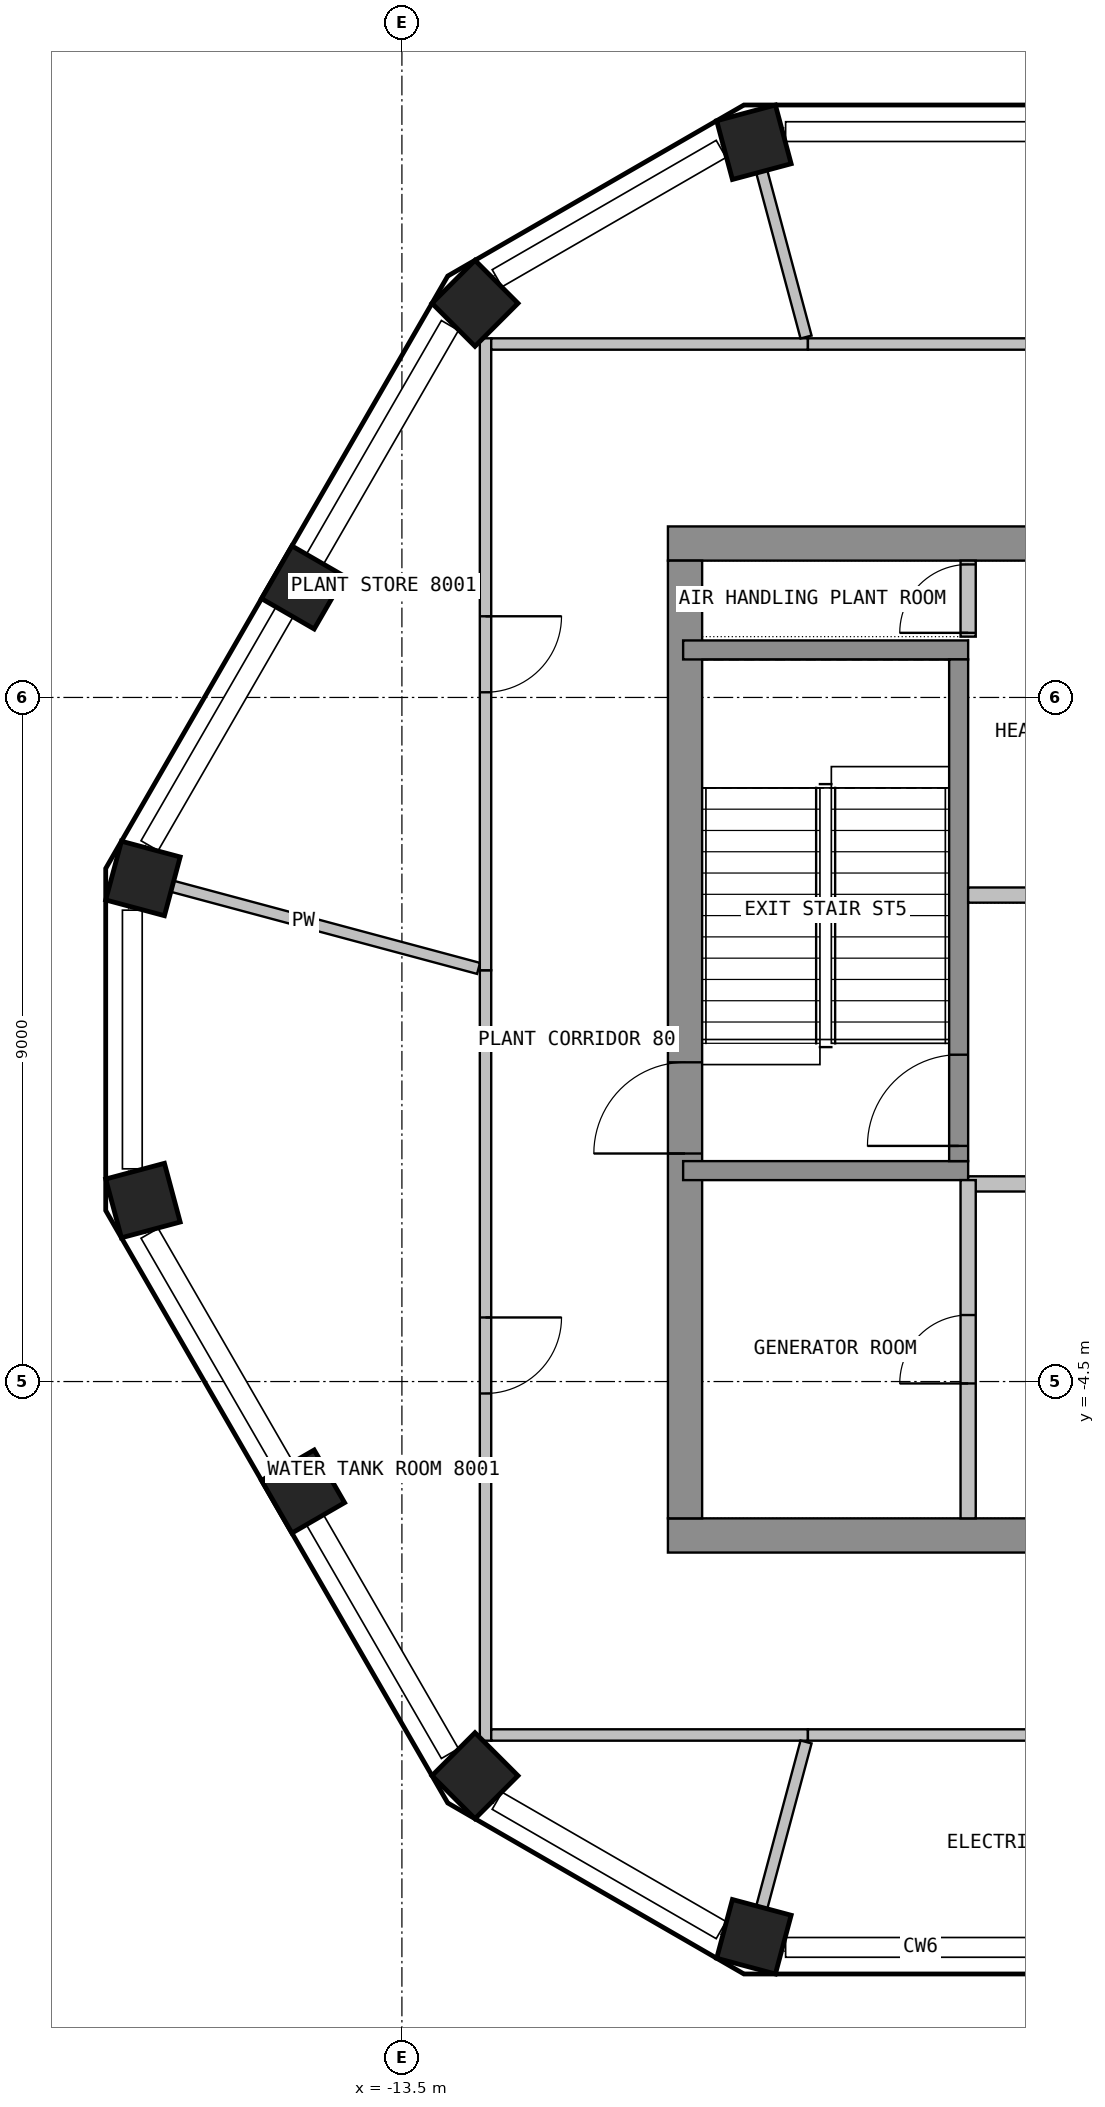
"""IFC4 building model, lengths in metres.
Left out: names, types, materials, properties, quantities, classifications, styles, units other than length and angle.
Written with IfcOpenShell. Run it as: python <this file> out.ifc"""

import sys

from ifc_helpers import new_model, si_unit, direction, frame, frame_2d, origin, origin_2d, place, context, subcontext, project, spatial, rectangle, extrude, element, fill, save


model = new_model("IFC4")
c1 = context("Model", 3, precision=1e-05, world=origin(), true_north=direction((0.0, 1.0)))
c2 = subcontext(c1, "Body", "Model", "MODEL_VIEW")
j1 = project(units=[si_unit("LENGTHUNIT", "METRE"), si_unit("PLANEANGLEUNIT", "RADIAN")], contexts=[c1])
p1 = place(None, origin())
s1 = spatial("IfcSite", under=j1, at=p1, CompositionType="ELEMENT")
p2 = place(p1, origin())
s2 = spatial("IfcBuilding", under=s1, at=p2, CompositionType="ELEMENT")
p3 = place(p2, frame((0.0, 0.0, 327.9)))
s3 = spatial("IfcBuildingStorey", under=s2, at=p3, CompositionType="ELEMENT", Elevation=327.9)
for number, where, z_axis, x_axis in (
    (1, (-8.869, -11.804, 0.0), (0.0, 0.0, 1.0), (0.966, -0.259, 0.0)),
    (2, (-8.869, 11.804, 0.0), (0.0, 0.0, 1.0), (-0.966, -0.259, 0.0)),
    (3, (-12.539, 9.686, 0.0), (0.0, 0.0, 1.0), (-0.707, -0.707, 0.0)),
    (4, (-14.801, 5.947, 0.0), (0.0, 0.0, 1.0), (-0.5, -0.866, 0.0)),
    (5, (-16.907, 2.119, 0.0), (0.0, 0.0, 1.0), (-0.259, -0.966, 0.0)),
    (6, (-16.907, -2.119, 0.0), (0.0, 0.0, 1.0), (0.259, -0.966, 0.0)),
    (7, (-14.801, -5.947, 0.0), (0.0, 0.0, 1.0), (0.5, -0.866, 0.0)),
    (8, (-12.539, -9.686, 0.0), (0.0, 0.0, 1.0), (0.707, -0.707, 0.0)),
):
    element("IfcColumn", number, at=place(p3, frame(where, z_axis=z_axis, x_axis=x_axis)), inside=s3, PredefinedType="COLUMN", context=c2, shape_type="SweptSolid", body=[
        extrude(rectangle(XDim=0.8, YDim=0.8, at=origin_2d()), origin(), (0.0, 0.0, 1.0), 3.6),
    ])
for number, where, z_axis, x_axis in (
    (9, (-10.0, 6.525, 0.0), (0.0, 0.0, 1.0), (1.0, 0.0, 0.0)),
    (10, (-10.0, -6.525, 0.0), (0.0, 0.0, 1.0), (1.0, 0.0, 0.0)),
):
    element("IfcWall", number, at=place(p3, frame(where, z_axis=z_axis, x_axis=x_axis)), inside=s3, PredefinedType="SHEAR", context=c2, shape_type="SweptSolid", body=[
        extrude(rectangle(XDim=20.0, YDim=0.45, at=frame_2d((10.0, 0.0))), origin(), (0.0, 0.0, 1.0), 3.6),
    ])
p4 = place(p3, frame((-9.775, -6.3, 0.0), z_axis=(0.0, 0.0, 1.0), x_axis=(0.0, 1.0, 0.0)))
e11 = element("IfcWall", 11, at=p4, inside=s3, PredefinedType="SHEAR", context=c2, shape_type="SweptSolid", body=[
    extrude(rectangle(XDim=12.6, YDim=0.45, at=frame_2d((6.3, 0.0))), origin(), (0.0, 0.0, 1.0), 3.6),
])
p5 = place(p4, frame((4.8, 0.0, 0.0)))
e12 = element("IfcOpeningElement", 12, at=p5, cuts=e11, PredefinedType="OPENING", context=c2, shape_type="SweptSolid", body=[
    extrude(rectangle(XDim=1.2, YDim=2.1, at=frame_2d((0.6, 1.05))), frame((0.0, 0.235, 0.0), z_axis=(0.0, -1.0, 0.0), x_axis=(1.0, 0.0, 0.0)), (0.0, 0.0, 1.0), 0.47),
])
for number, where, z_axis, x_axis in (
    (13, (-9.8, -1.725, 0.0), (0.0, 0.0, 1.0), (1.0, 0.0, 0.0)),
    (14, (-9.8, 5.125, 0.0), (0.0, 0.0, 1.0), (1.0, 0.0, 0.0)),
):
    element("IfcWall", number, at=place(p3, frame(where, z_axis=z_axis, x_axis=x_axis)), inside=s3, PredefinedType="SHEAR", context=c2, shape_type="SweptSolid", body=[
        extrude(rectangle(XDim=3.75, YDim=0.25, at=frame_2d((1.875, 0.0))), origin(), (0.0, 0.0, 1.0), 3.6),
    ])
p6 = place(p3, frame((-6.175, -1.6, 0.0), z_axis=(0.0, 0.0, 1.0), x_axis=(0.0, 1.0, 0.0)))
e15 = element("IfcWall", 15, at=p6, inside=s3, PredefinedType="SHEAR", context=c2, shape_type="SweptSolid", body=[
    extrude(rectangle(XDim=6.6, YDim=0.25, at=frame_2d((3.3, 0.0))), origin(), (0.0, 0.0, 1.0), 3.6),
])
p7 = place(p6, frame((0.2, 0.0, 0.0)))
e16 = element("IfcOpeningElement", 16, at=p7, cuts=e15, PredefinedType="OPENING", context=c2, shape_type="SweptSolid", body=[
    extrude(rectangle(XDim=1.2, YDim=2.1, at=frame_2d((0.6, 1.05))), frame((0.0, 0.135, 0.0), z_axis=(0.0, -1.0, 0.0), x_axis=(1.0, 0.0, 0.0)), (0.0, 0.0, 1.0), 0.27),
])
p8 = place(p3, frame((-6.05, 1.9, 0.0), z_axis=(0.0, 0.0, 1.0), x_axis=(1.0, 0.0, 0.0)))
e17 = element("IfcWall", 17, at=p8, inside=s3, PredefinedType="PARTITIONING", context=c2, shape_type="SweptSolid", body=[
    extrude(rectangle(XDim=4.525, YDim=0.2, at=frame_2d((2.263, 0.0))), origin(), (0.0, 0.0, 1.0), 3.6),
])
p9 = place(p8, frame((1.812, 0.0, 0.0)))
e18 = element("IfcOpeningElement", 18, at=p9, cuts=e17, PredefinedType="OPENING", context=c2, shape_type="SweptSolid", body=[
    extrude(rectangle(XDim=0.9, YDim=2.1, at=frame_2d((0.45, 1.05))), frame((0.0, 0.11, 0.0), z_axis=(0.0, -1.0, 0.0), x_axis=(1.0, 0.0, 0.0)), (0.0, 0.0, 1.0), 0.22),
])
p10 = place(p3, frame((-6.05, -1.9, 0.0), z_axis=(0.0, 0.0, 1.0), x_axis=(1.0, 0.0, 0.0)))
e19 = element("IfcWall", 19, at=p10, inside=s3, PredefinedType="PARTITIONING", context=c2, shape_type="SweptSolid", body=[
    extrude(rectangle(XDim=4.525, YDim=0.2, at=frame_2d((2.263, 0.0))), origin(), (0.0, 0.0, 1.0), 3.6),
])
p11 = place(p10, frame((1.812, 0.0, 0.0)))
e20 = element("IfcOpeningElement", 20, at=p11, cuts=e19, PredefinedType="OPENING", context=c2, shape_type="SweptSolid", body=[
    extrude(rectangle(XDim=0.9, YDim=2.1, at=frame_2d((0.45, 1.05))), frame((0.0, 0.11, 0.0), z_axis=(0.0, -1.0, 0.0), x_axis=(1.0, 0.0, 0.0)), (0.0, 0.0, 1.0), 0.22),
])
p12 = place(p3, frame((-6.05, 5.3, 0.0), z_axis=(0.0, 0.0, 1.0), x_axis=(0.0, 1.0, 0.0)))
e21 = element("IfcWall", 21, at=p12, inside=s3, PredefinedType="PARTITIONING", context=c2, shape_type="SweptSolid", body=[
    extrude(rectangle(XDim=1.0, YDim=0.2, at=frame_2d((0.5, 0.0))), origin(), (0.0, 0.0, 1.0), 3.6),
])
p13 = place(p12, frame((0.05, 0.0, 0.0)))
e22 = element("IfcOpeningElement", 22, at=p13, cuts=e21, PredefinedType="OPENING", context=c2, shape_type="SweptSolid", body=[
    extrude(rectangle(XDim=0.9, YDim=2.1, at=frame_2d((0.45, 1.05))), frame((0.0, 0.11, 0.0), z_axis=(0.0, -1.0, 0.0), x_axis=(1.0, 0.0, 0.0)), (0.0, 0.0, 1.0), 0.22),
])
p14 = place(p3, frame((-6.05, -6.3, 0.0), z_axis=(0.0, 0.0, 1.0), x_axis=(0.0, 1.0, 0.0)))
e23 = element("IfcWall", 23, at=p14, inside=s3, PredefinedType="PARTITIONING", context=c2, shape_type="SweptSolid", body=[
    extrude(rectangle(XDim=4.45, YDim=0.2, at=frame_2d((2.225, 0.0))), origin(), (0.0, 0.0, 1.0), 3.6),
])
p15 = place(p14, frame((1.775, 0.0, 0.0)))
e24 = element("IfcOpeningElement", 24, at=p15, cuts=e23, PredefinedType="OPENING", context=c2, shape_type="SweptSolid", body=[
    extrude(rectangle(XDim=0.9, YDim=2.1, at=frame_2d((0.45, 1.05))), frame((0.0, 0.11, 0.0), z_axis=(0.0, -1.0, 0.0), x_axis=(1.0, 0.0, 0.0)), (0.0, 0.0, 1.0), 0.22),
])
p16 = place(p3, frame((-17.097, 2.17, 0.0), z_axis=(0.0, 0.0, 1.0), x_axis=(0.965904388236, -0.258899039756, 0.0)))
e25 = element("IfcWall", 25, at=p16, inside=s3, PredefinedType="PARTITIONING", context=c2, shape_type="SweptSolid", body=[
    extrude(rectangle(XDim=4.768, YDim=0.15, at=frame_2d((2.384, 0.0))), origin(), (0.0, 0.0, 1.0), 3.6),
])
p17 = place(p3, frame((-12.4, 0.911, 0.0), z_axis=(0.0, 0.0, 1.0), x_axis=(0.0, -1.0, 0.0)))
e26 = element("IfcWall", 26, at=p17, inside=s3, PredefinedType="PARTITIONING", context=c2, shape_type="SweptSolid", body=[
    extrude(rectangle(XDim=10.136, YDim=0.15, at=frame_2d((5.068, 0.0))), origin(), (0.0, 0.0, 1.0), 3.6),
])
p18 = place(p17, frame((4.568, 0.0, 0.0)))
e27 = element("IfcOpeningElement", 27, at=p18, cuts=e26, PredefinedType="OPENING", context=c2, shape_type="SweptSolid", body=[
    extrude(rectangle(XDim=1.0, YDim=2.1, at=frame_2d((0.5, 1.05))), frame((0.0, 0.085, 0.0), z_axis=(0.0, -1.0, 0.0), x_axis=(1.0, 0.0, 0.0)), (0.0, 0.0, 1.0), 0.17),
])
p19 = place(p3, frame((-12.325, -9.15, 0.0), z_axis=(0.0, 0.0, 1.0), x_axis=(1.0, 0.0, 0.0)))
e28 = element("IfcWall", 28, at=p19, inside=s3, PredefinedType="PARTITIONING", context=c2, shape_type="SweptSolid", body=[
    extrude(rectangle(XDim=4.167, YDim=0.15, at=frame_2d((2.083, 0.0))), origin(), (0.0, 0.0, 1.0), 3.6),
])
p20 = place(p3, frame((-12.4, 9.225, 0.0), z_axis=(0.0, 0.0, 1.0), x_axis=(0.0, -1.0, 0.0)))
e29 = element("IfcWall", 29, at=p20, inside=s3, PredefinedType="PARTITIONING", context=c2, shape_type="SweptSolid", body=[
    extrude(rectangle(XDim=8.314, YDim=0.15, at=frame_2d((4.157, 0.0))), origin(), (0.0, 0.0, 1.0), 3.6),
])
p21 = place(p20, frame((3.657, 0.0, 0.0)))
e30 = element("IfcOpeningElement", 30, at=p21, cuts=e29, PredefinedType="OPENING", context=c2, shape_type="SweptSolid", body=[
    extrude(rectangle(XDim=1.0, YDim=2.1, at=frame_2d((0.5, 1.05))), frame((0.0, 0.085, 0.0), z_axis=(0.0, -1.0, 0.0), x_axis=(1.0, 0.0, 0.0)), (0.0, 0.0, 1.0), 0.17),
])
p22 = place(p3, frame((-8.158, 9.15, 0.0), z_axis=(0.0, 0.0, 1.0), x_axis=(-1.0, 0.0, 0.0)))
e31 = element("IfcWall", 31, at=p22, inside=s3, PredefinedType="PARTITIONING", context=c2, shape_type="SweptSolid", body=[
    extrude(rectangle(XDim=4.167, YDim=0.15, at=frame_2d((2.083, 0.0))), origin(), (0.0, 0.0, 1.0), 3.6),
])
for number, where, z_axis, x_axis in (
    (32, (-8.183, -9.242, 0.0), (0.0, 0.0, 1.0), (-0.259, -0.966, 0.0)),
    (33, (-8.92, 11.994, 0.0), (0.0, 0.0, 1.0), (0.259, -0.966, 0.0)),
):
    element("IfcWall", number, at=place(p3, frame(where, z_axis=z_axis, x_axis=x_axis)), inside=s3, PredefinedType="PARTITIONING", context=c2, shape_type="SweptSolid", body=[
        extrude(rectangle(XDim=2.849, YDim=0.15, at=frame_2d((1.425, 0.0))), origin(), (0.0, 0.0, 1.0), 3.6),
    ])
p23 = place(p3, frame((-8.158, -9.15, 0.0), z_axis=(0.0, 0.0, 1.0), x_axis=(1.0, 0.0, 0.0)))
e34 = element("IfcWall", 34, at=p23, inside=s3, PredefinedType="PARTITIONING", context=c2, shape_type="SweptSolid", body=[
    extrude(rectangle(XDim=8.158, YDim=0.15, at=frame_2d((4.079, 0.0))), origin(), (0.0, 0.0, 1.0), 3.6),
])
p24 = place(p23, frame((3.579, 0.0, 0.0)))
e35 = element("IfcOpeningElement", 35, at=p24, cuts=e34, PredefinedType="OPENING", context=c2, shape_type="SweptSolid", body=[
    extrude(rectangle(XDim=1.0, YDim=2.1, at=frame_2d((0.5, 1.05))), frame((0.0, 0.085, 0.0), z_axis=(0.0, -1.0, 0.0), x_axis=(1.0, 0.0, 0.0)), (0.0, 0.0, 1.0), 0.17),
])
p25 = place(p3, frame((4.5, 9.15, 0.0), z_axis=(0.0, 0.0, 1.0), x_axis=(-1.0, 0.0, 0.0)))
e36 = element("IfcWall", 36, at=p25, inside=s3, PredefinedType="PARTITIONING", context=c2, shape_type="SweptSolid", body=[
    extrude(rectangle(XDim=12.658, YDim=0.15, at=frame_2d((6.329, 0.0))), origin(), (0.0, 0.0, 1.0), 3.6),
])
p26 = place(p25, frame((5.829, 0.0, 0.0)))
e37 = element("IfcOpeningElement", 37, at=p26, cuts=e36, PredefinedType="OPENING", context=c2, shape_type="SweptSolid", body=[
    extrude(rectangle(XDim=1.0, YDim=2.1, at=frame_2d((0.5, 1.05))), frame((0.0, 0.085, 0.0), z_axis=(0.0, -1.0, 0.0), x_axis=(1.0, 0.0, 0.0)), (0.0, 0.0, 1.0), 0.17),
])
p27 = place(p5, origin())
e38 = element("IfcDoor", 38, at=p27, inside=s3, OperationType="SINGLE_SWING_RIGHT", PredefinedType="DOOR", context=c2, shape_type="SweptSolid", body=[
    extrude(rectangle(XDim=1.2, YDim=2.1, at=frame_2d((0.6, 1.05))), frame((0.0, 0.025, 0.0), z_axis=(0.0, -1.0, 0.0), x_axis=(1.0, 0.0, 0.0)), (0.0, 0.0, 1.0), 0.05),
])
fill(e12, e38)
p28 = place(p7, origin())
e39 = element("IfcDoor", 39, at=p28, inside=s3, OperationType="SINGLE_SWING_LEFT", PredefinedType="DOOR", context=c2, shape_type="SweptSolid", body=[
    extrude(rectangle(XDim=1.2, YDim=2.1, at=frame_2d((0.6, 1.05))), frame((0.0, 0.025, 0.0), z_axis=(0.0, -1.0, 0.0), x_axis=(1.0, 0.0, 0.0)), (0.0, 0.0, 1.0), 0.05),
])
fill(e16, e39)
p29 = place(p13, origin())
e40 = element("IfcDoor", 40, at=p29, inside=s3, OperationType="SINGLE_SWING_LEFT", PredefinedType="DOOR", context=c2, shape_type="SweptSolid", body=[
    extrude(rectangle(XDim=0.9, YDim=2.1, at=frame_2d((0.45, 1.05))), frame((0.0, 0.025, 0.0), z_axis=(0.0, -1.0, 0.0), x_axis=(1.0, 0.0, 0.0)), (0.0, 0.0, 1.0), 0.05),
])
fill(e22, e40)
p30 = place(p15, origin())
e41 = element("IfcDoor", 41, at=p30, inside=s3, OperationType="SINGLE_SWING_LEFT", PredefinedType="DOOR", context=c2, shape_type="SweptSolid", body=[
    extrude(rectangle(XDim=0.9, YDim=2.1, at=frame_2d((0.45, 1.05))), frame((0.0, 0.025, 0.0), z_axis=(0.0, -1.0, 0.0), x_axis=(1.0, 0.0, 0.0)), (0.0, 0.0, 1.0), 0.05),
])
fill(e24, e41)
p31 = place(p18, origin())
e42 = element("IfcDoor", 42, at=p31, inside=s3, OperationType="SINGLE_SWING_LEFT", PredefinedType="DOOR", context=c2, shape_type="SweptSolid", body=[
    extrude(rectangle(XDim=1.0, YDim=2.1, at=frame_2d((0.5, 1.05))), frame((0.0, 0.025, 0.0), z_axis=(0.0, -1.0, 0.0), x_axis=(1.0, 0.0, 0.0)), (0.0, 0.0, 1.0), 0.05),
])
fill(e27, e42)
p32 = place(p21, origin())
e43 = element("IfcDoor", 43, at=p32, inside=s3, OperationType="SINGLE_SWING_RIGHT", PredefinedType="DOOR", context=c2, shape_type="SweptSolid", body=[
    extrude(rectangle(XDim=1.0, YDim=2.1, at=frame_2d((0.5, 1.05))), frame((0.0, 0.025, 0.0), z_axis=(0.0, -1.0, 0.0), x_axis=(1.0, 0.0, 0.0)), (0.0, 0.0, 1.0), 0.05),
])
fill(e30, e43)
save(model, sys.argv[1])
